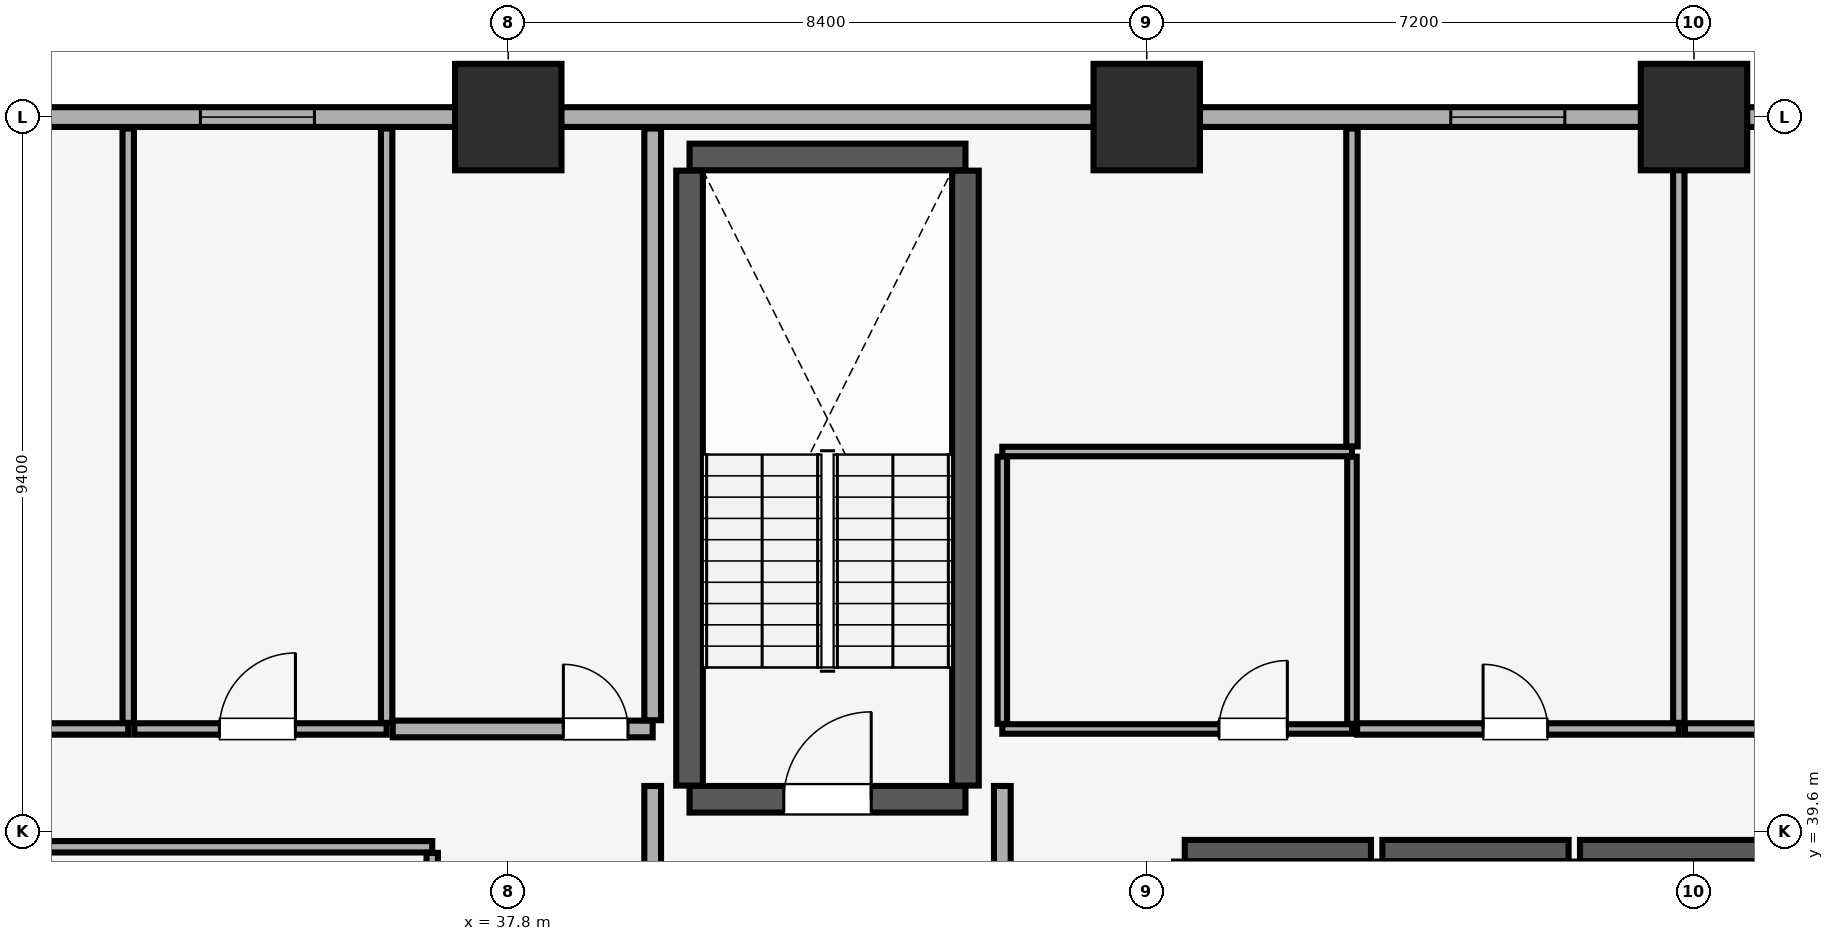
"""IFC4 building model, lengths in metres.
Left out: names, types, materials, properties, quantities, classifications, styles, units other than length and angle.
Written with IfcOpenShell. Run it as: python <this file> out.ifc"""

import sys

from ifc_helpers import new_model, si_unit, direction, frame, frame_2d, origin, origin_2d, place, context, subcontext, project, spatial, rectangle, extrude, element, fill, save


model = new_model("IFC4")
c1 = context("Model", 3, precision=1e-05, world=origin(), true_north=direction((0.0, 1.0)))
c2 = subcontext(c1, "Body", "Model", "MODEL_VIEW")
j1 = project(units=[si_unit("LENGTHUNIT", "METRE"), si_unit("PLANEANGLEUNIT", "RADIAN")], contexts=[c1])
p1 = place(None, origin())
s1 = spatial("IfcSite", under=j1, at=p1, CompositionType="ELEMENT")
p2 = place(p1, origin())
s2 = spatial("IfcBuilding", under=s1, at=p2, CompositionType="ELEMENT")
p3 = place(p2, frame((0.0, 0.0, 72.65)))
s3 = spatial("IfcBuildingStorey", under=s2, at=p3, CompositionType="ELEMENT", Elevation=72.65)
for number, where, z_axis, x_axis in (
    (1, (37.8, 49.0, 0.0), (0.0, 0.0, 1.0), (1.0, 0.0, 0.0)),
    (2, (46.2, 49.0, 0.0), (0.0, 0.0, 1.0), (1.0, 0.0, 0.0)),
    (3, (53.4, 49.0, 0.0), (0.0, 0.0, 1.0), (1.0, 0.0, 0.0)),
):
    element("IfcColumn", number, at=place(p3, frame(where, z_axis=z_axis, x_axis=x_axis)), inside=s3, PredefinedType="COLUMN", context=c2, shape_type="SweptSolid", body=[
        extrude(rectangle(XDim=1.4, YDim=1.4, at=origin_2d()), origin(), (0.0, 0.0, 1.0), 3.51),
    ])
p4 = place(p3, frame((79.8, 49.0, 0.0), z_axis=(0.0, 0.0, 1.0), x_axis=(-1.0, 0.0, 0.0)))
e4 = element("IfcWall", 4, at=p4, inside=s3, PredefinedType="SOLIDWALL", context=c2, shape_type="SweptSolid", body=[
    extrude(rectangle(XDim=75.6, YDim=0.26, at=frame_2d((37.8, 0.0))), origin(), (0.0, 0.0, 1.0), 2.56),
])
p5 = place(p4, frame((72.565, 0.0, 0.85)))
e5 = element("IfcOpeningElement", 5, at=p5, cuts=e4, PredefinedType="OPENING", context=c2, shape_type="SweptSolid", body=[
    extrude(rectangle(XDim=1.5, YDim=1.4, at=frame_2d((0.75, 0.7))), frame((0.0, 0.14, 0.0), z_axis=(0.0, -1.0, 0.0), x_axis=(1.0, 0.0, 0.0)), (0.0, 0.0, 1.0), 0.28),
])
p6 = place(p4, frame((67.45, 0.0, 0.85)))
e6 = element("IfcOpeningElement", 6, at=p6, cuts=e4, PredefinedType="OPENING", context=c2, shape_type="SweptSolid", body=[
    extrude(rectangle(XDim=1.5, YDim=1.4, at=frame_2d((0.75, 0.7))), frame((0.0, 0.14, 0.0), z_axis=(0.0, -1.0, 0.0), x_axis=(1.0, 0.0, 0.0)), (0.0, 0.0, 1.0), 0.28),
])
p7 = place(p4, frame((6.65, 0.0, 0.85)))
e7 = element("IfcOpeningElement", 7, at=p7, cuts=e4, PredefinedType="OPENING", context=c2, shape_type="SweptSolid", body=[
    extrude(rectangle(XDim=1.5, YDim=1.4, at=frame_2d((0.75, 0.7))), frame((0.0, 0.14, 0.0), z_axis=(0.0, -1.0, 0.0), x_axis=(1.0, 0.0, 0.0)), (0.0, 0.0, 1.0), 0.28),
])
p8 = place(p4, frame((1.535, 0.0, 0.85)))
e8 = element("IfcOpeningElement", 8, at=p8, cuts=e4, PredefinedType="OPENING", context=c2, shape_type="SweptSolid", body=[
    extrude(rectangle(XDim=1.5, YDim=1.4, at=frame_2d((0.75, 0.7))), frame((0.0, 0.14, 0.0), z_axis=(0.0, -1.0, 0.0), x_axis=(1.0, 0.0, 0.0)), (0.0, 0.0, 1.0), 0.28),
])
p9 = place(p4, frame((51.365, 0.0, 0.9)))
e9 = element("IfcOpeningElement", 9, at=p9, cuts=e4, PredefinedType="OPENING", context=c2, shape_type="SweptSolid", body=[
    extrude(rectangle(XDim=1.5, YDim=1.4, at=frame_2d((0.75, 0.7))), frame((0.0, 0.14, 0.0), z_axis=(0.0, -1.0, 0.0), x_axis=(1.0, 0.0, 0.0)), (0.0, 0.0, 1.0), 0.28),
])
p10 = place(p4, frame((44.55, 0.0, 0.9)))
e10 = element("IfcOpeningElement", 10, at=p10, cuts=e4, PredefinedType="OPENING", context=c2, shape_type="SweptSolid", body=[
    extrude(rectangle(XDim=1.5, YDim=1.4, at=frame_2d((0.75, 0.7))), frame((0.0, 0.14, 0.0), z_axis=(0.0, -1.0, 0.0), x_axis=(1.0, 0.0, 0.0)), (0.0, 0.0, 1.0), 0.28),
])
p11 = place(p4, frame((28.1, 0.0, 0.9)))
e11 = element("IfcOpeningElement", 11, at=p11, cuts=e4, PredefinedType="OPENING", context=c2, shape_type="SweptSolid", body=[
    extrude(rectangle(XDim=1.5, YDim=1.4, at=frame_2d((0.75, 0.7))), frame((0.0, 0.14, 0.0), z_axis=(0.0, -1.0, 0.0), x_axis=(1.0, 0.0, 0.0)), (0.0, 0.0, 1.0), 0.28),
])
p12 = place(p4, frame((23.485, 0.0, 0.9)))
e12 = element("IfcOpeningElement", 12, at=p12, cuts=e4, PredefinedType="OPENING", context=c2, shape_type="SweptSolid", body=[
    extrude(rectangle(XDim=1.5, YDim=1.4, at=frame_2d((0.75, 0.7))), frame((0.0, 0.14, 0.0), z_axis=(0.0, -1.0, 0.0), x_axis=(1.0, 0.0, 0.0)), (0.0, 0.0, 1.0), 0.28),
])
p13 = place(p3, frame((40.185, 40.025, 0.0), z_axis=(0.0, 0.0, 1.0), x_axis=(1.0, 0.0, 0.0)))
e13 = element("IfcWall", 13, at=p13, inside=s3, PredefinedType="SHEAR", context=c2, shape_type="SweptSolid", body=[
    extrude(rectangle(XDim=3.63, YDim=0.35, at=frame_2d((1.815, 0.0))), origin(), (0.0, 0.0, 1.0), 3.51),
])
p14 = place(p13, frame((1.24, 0.0, 0.0)))
e14 = element("IfcOpeningElement", 14, at=p14, cuts=e13, PredefinedType="OPENING", context=c2, shape_type="SweptSolid", body=[
    extrude(rectangle(XDim=1.15, YDim=2.15, at=frame_2d((0.575, 1.075))), frame((0.0, 0.185, 0.0), z_axis=(0.0, -1.0, 0.0), x_axis=(1.0, 0.0, 0.0)), (0.0, 0.0, 1.0), 0.37),
])
p15 = place(p3, frame((40.185, 48.475, 0.0), z_axis=(0.0, 0.0, 1.0), x_axis=(1.0, 0.0, 0.0)))
e15 = element("IfcWall", 15, at=p15, inside=s3, PredefinedType="SHEAR", context=c2, shape_type="SweptSolid", body=[
    extrude(rectangle(XDim=3.63, YDim=0.35, at=frame_2d((1.815, 0.0))), origin(), (0.0, 0.0, 1.0), 3.51),
])
for number, where, z_axis, x_axis in (
    (16, (40.185, 40.205, 0.0), (0.0, 0.0, 1.0), (0.0, 1.0, 0.0)),
    (17, (43.815, 40.205, 0.0), (0.0, 0.0, 1.0), (0.0, 1.0, 0.0)),
):
    element("IfcWall", number, at=place(p3, frame(where, z_axis=z_axis, x_axis=x_axis)), inside=s3, PredefinedType="SHEAR", context=c2, shape_type="SweptSolid", body=[
        extrude(rectangle(XDim=8.09, YDim=0.35, at=frame_2d((4.045, 0.0))), origin(), (0.0, 0.0, 1.0), 3.51),
    ])
p16 = place(p3, frame((46.7, 39.35, 0.0), z_axis=(0.0, 0.0, 1.0), x_axis=(1.0, 0.0, 0.0)))
e18 = element("IfcWall", 18, at=p16, inside=s3, PredefinedType="SHEAR", context=c2, shape_type="SweptSolid", body=[
    extrude(rectangle(XDim=2.45, YDim=0.28, at=frame_2d((1.225, 0.0))), origin(), (0.0, 0.0, 1.0), 3.51),
])
for number, where, z_axis, x_axis in (
    (19, (46.7, 37.145, 0.0), (0.0, 0.0, 1.0), (0.0, 1.0, 0.0)),
    (20, (49.15, 37.145, 0.0), (0.0, 0.0, 1.0), (0.0, 1.0, 0.0)),
):
    element("IfcWall", number, at=place(p3, frame(where, z_axis=z_axis, x_axis=x_axis)), inside=s3, PredefinedType="SHEAR", context=c2, shape_type="SweptSolid", body=[
        extrude(rectangle(XDim=2.06, YDim=0.28, at=frame_2d((1.03, 0.0))), origin(), (0.0, 0.0, 1.0), 3.51),
    ])
p17 = place(p3, frame((49.3, 39.35, 0.0), z_axis=(0.0, 0.0, 1.0), x_axis=(1.0, 0.0, 0.0)))
e21 = element("IfcWall", 21, at=p17, inside=s3, PredefinedType="SHEAR", context=c2, shape_type="SweptSolid", body=[
    extrude(rectangle(XDim=2.45, YDim=0.28, at=frame_2d((1.225, 0.0))), origin(), (0.0, 0.0, 1.0), 3.51),
])
p18 = place(p3, frame((51.75, 37.145, 0.0), z_axis=(0.0, 0.0, 1.0), x_axis=(0.0, 1.0, 0.0)))
e22 = element("IfcWall", 22, at=p18, inside=s3, PredefinedType="SHEAR", context=c2, shape_type="SweptSolid", body=[
    extrude(rectangle(XDim=2.06, YDim=0.28, at=frame_2d((1.03, 0.0))), origin(), (0.0, 0.0, 1.0), 3.51),
])
p19 = place(p3, frame((51.9, 39.35, 0.0), z_axis=(0.0, 0.0, 1.0), x_axis=(1.0, 0.0, 0.0)))
e23 = element("IfcWall", 23, at=p19, inside=s3, PredefinedType="SHEAR", context=c2, shape_type="SweptSolid", body=[
    extrude(rectangle(XDim=2.59, YDim=0.28, at=frame_2d((1.295, 0.0))), origin(), (0.0, 0.0, 1.0), 3.51),
])
for number, where, z_axis, x_axis in (
    (24, (39.7, 34.415, 0.0), (0.0, 0.0, 1.0), (0.0, 1.0, 0.0)),
    (25, (44.3, 34.415, 0.0), (0.0, 0.0, 1.0), (0.0, 1.0, 0.0)),
):
    element("IfcWall", number, at=place(p3, frame(where, z_axis=z_axis, x_axis=x_axis)), inside=s3, PredefinedType="PARTITIONING", context=c2, shape_type="SweptSolid", body=[
        extrude(rectangle(XDim=5.785, YDim=0.22, at=frame_2d((2.893, 0.0))), origin(), (0.0, 0.0, 1.0), 3.51),
    ])
p20 = place(p3, frame((31.6, 39.4, 0.0), z_axis=(0.0, 0.0, 1.0), x_axis=(1.0, 0.0, 0.0)))
e26 = element("IfcWall", 26, at=p20, inside=s3, PredefinedType="PARTITIONING", context=c2, shape_type="SweptSolid", body=[
    extrude(rectangle(XDim=5.2, YDim=0.15, at=frame_2d((2.6, 0.0))), origin(), (0.0, 0.0, 1.0), 3.51),
])
p21 = place(p3, frame((36.8, 34.38, 0.0), z_axis=(0.0, 0.0, 1.0), x_axis=(0.0, 1.0, 0.0)))
e27 = element("IfcWall", 27, at=p21, inside=s3, PredefinedType="PARTITIONING", context=c2, shape_type="SweptSolid", body=[
    extrude(rectangle(XDim=4.94, YDim=0.15, at=frame_2d((2.47, 0.0))), origin(), (0.0, 0.0, 1.0), 3.51),
])
p22 = place(p3, frame((25.0, 40.95, 0.0), z_axis=(0.0, 0.0, 1.0), x_axis=(1.0, 0.0, 0.0)))
e28 = element("IfcWall", 28, at=p22, inside=s3, PredefinedType="PARTITIONING", context=c2, shape_type="SweptSolid", body=[
    extrude(rectangle(XDim=7.8, YDim=0.15, at=frame_2d((3.9, 0.0))), origin(), (0.0, 0.0, 1.0), 3.51),
])
p23 = place(p22, frame((3.475, 0.0, 0.0)))
e29 = element("IfcOpeningElement", 29, at=p23, cuts=e28, PredefinedType="OPENING", context=c2, shape_type="SweptSolid", body=[
    extrude(rectangle(XDim=0.85, YDim=2.1, at=frame_2d((0.425, 1.05))), frame((0.0, 0.085, 0.0), z_axis=(0.0, -1.0, 0.0), x_axis=(1.0, 0.0, 0.0)), (0.0, 0.0, 1.0), 0.17),
])
p24 = place(p3, frame((32.8, 41.03, 0.0), z_axis=(0.0, 0.0, 1.0), x_axis=(0.0, 1.0, 0.0)))
e30 = element("IfcWall", 30, at=p24, inside=s3, PredefinedType="PARTITIONING", context=c2, shape_type="SweptSolid", body=[
    extrude(rectangle(XDim=7.82, YDim=0.15, at=frame_2d((3.91, 0.0))), origin(), (0.0, 0.0, 1.0), 3.51),
])
p25 = place(p3, frame((32.88, 40.95, 0.0), z_axis=(0.0, 0.0, 1.0), x_axis=(1.0, 0.0, 0.0)))
e31 = element("IfcWall", 31, at=p25, inside=s3, PredefinedType="PARTITIONING", context=c2, shape_type="SweptSolid", body=[
    extrude(rectangle(XDim=3.32, YDim=0.15, at=frame_2d((1.66, 0.0))), origin(), (0.0, 0.0, 1.0), 3.51),
])
p26 = place(p25, frame((1.12, 0.0, 0.0)))
e32 = element("IfcOpeningElement", 32, at=p26, cuts=e31, PredefinedType="OPENING", context=c2, shape_type="SweptSolid", body=[
    extrude(rectangle(XDim=1.0, YDim=2.15, at=frame_2d((0.5, 1.075))), frame((0.0, 0.085, 0.0), z_axis=(0.0, -1.0, 0.0), x_axis=(1.0, 0.0, 0.0)), (0.0, 0.0, 1.0), 0.17),
])
p27 = place(p3, frame((36.2, 41.03, 0.0), z_axis=(0.0, 0.0, 1.0), x_axis=(0.0, 1.0, 0.0)))
e33 = element("IfcWall", 33, at=p27, inside=s3, PredefinedType="PARTITIONING", context=c2, shape_type="SweptSolid", body=[
    extrude(rectangle(XDim=7.82, YDim=0.15, at=frame_2d((3.91, 0.0))), origin(), (0.0, 0.0, 1.0), 3.51),
])
p28 = place(p3, frame((36.28, 40.95, 0.0), z_axis=(0.0, 0.0, 1.0), x_axis=(1.0, 0.0, 0.0)))
e34 = element("IfcWall", 34, at=p28, inside=s3, PredefinedType="PARTITIONING", context=c2, shape_type="SweptSolid", body=[
    extrude(rectangle(XDim=3.42, YDim=0.22, at=frame_2d((1.71, 0.0))), origin(), (0.0, 0.0, 1.0), 3.51),
])
p29 = place(p28, frame((2.245, 0.0, 0.0)))
e35 = element("IfcOpeningElement", 35, at=p29, cuts=e34, PredefinedType="OPENING", context=c2, shape_type="SweptSolid", body=[
    extrude(rectangle(XDim=0.85, YDim=2.1, at=frame_2d((0.425, 1.05))), frame((0.0, 0.12, 0.0), z_axis=(0.0, -1.0, 0.0), x_axis=(1.0, 0.0, 0.0)), (0.0, 0.0, 1.0), 0.24),
])
p30 = place(p3, frame((39.7, 41.065, 0.0), z_axis=(0.0, 0.0, 1.0), x_axis=(0.0, 1.0, 0.0)))
e36 = element("IfcWall", 36, at=p30, inside=s3, PredefinedType="PARTITIONING", context=c2, shape_type="SweptSolid", body=[
    extrude(rectangle(XDim=7.785, YDim=0.22, at=frame_2d((3.893, 0.0))), origin(), (0.0, 0.0, 1.0), 3.51),
])
p31 = place(p3, frame((44.3, 40.95, 0.0), z_axis=(0.0, 0.0, 1.0), x_axis=(1.0, 0.0, 0.0)))
e37 = element("IfcWall", 37, at=p31, inside=s3, PredefinedType="PARTITIONING", context=c2, shape_type="SweptSolid", body=[
    extrude(rectangle(XDim=4.6, YDim=0.125, at=frame_2d((2.3, 0.0))), origin(), (0.0, 0.0, 1.0), 3.51),
])
p32 = place(p31, frame((2.85, 0.0, 0.0)))
e38 = element("IfcOpeningElement", 38, at=p32, cuts=e37, PredefinedType="OPENING", context=c2, shape_type="SweptSolid", body=[
    extrude(rectangle(XDim=0.9, YDim=2.1, at=frame_2d((0.45, 1.05))), frame((0.0, 0.073, 0.0), z_axis=(0.0, -1.0, 0.0), x_axis=(1.0, 0.0, 0.0)), (0.0, 0.0, 1.0), 0.145),
])
p33 = place(p3, frame((44.3, 44.6, 0.0), z_axis=(0.0, 0.0, 1.0), x_axis=(1.0, 0.0, 0.0)))
e39 = element("IfcWall", 39, at=p33, inside=s3, PredefinedType="PARTITIONING", context=c2, shape_type="SweptSolid", body=[
    extrude(rectangle(XDim=4.6, YDim=0.125, at=frame_2d((2.3, 0.0))), origin(), (0.0, 0.0, 1.0), 3.51),
])
for number, where, z_axis, x_axis in (
    (40, (44.3, 41.018, 0.0), (0.0, 0.0, 1.0), (0.0, 1.0, 0.0)),
    (41, (48.9, 41.018, 0.0), (0.0, 0.0, 1.0), (0.0, 1.0, 0.0)),
):
    element("IfcWall", number, at=place(p3, frame(where, z_axis=z_axis, x_axis=x_axis)), inside=s3, PredefinedType="PARTITIONING", context=c2, shape_type="SweptSolid", body=[
        extrude(rectangle(XDim=3.515, YDim=0.125, at=frame_2d((1.757, 0.0))), origin(), (0.0, 0.0, 1.0), 3.51),
    ])
p34 = place(p3, frame((48.968, 40.95, 0.0), z_axis=(0.0, 0.0, 1.0), x_axis=(1.0, 0.0, 0.0)))
e42 = element("IfcWall", 42, at=p34, inside=s3, PredefinedType="PARTITIONING", context=c2, shape_type="SweptSolid", body=[
    extrude(rectangle(XDim=4.232, YDim=0.15, at=frame_2d((2.116, 0.0))), origin(), (0.0, 0.0, 1.0), 3.51),
])
p35 = place(p34, frame((1.657, 0.0, 0.0)))
e43 = element("IfcOpeningElement", 43, at=p35, cuts=e42, PredefinedType="OPENING", context=c2, shape_type="SweptSolid", body=[
    extrude(rectangle(XDim=0.85, YDim=2.1, at=frame_2d((0.425, 1.05))), frame((0.0, 0.085, 0.0), z_axis=(0.0, -1.0, 0.0), x_axis=(1.0, 0.0, 0.0)), (0.0, 0.0, 1.0), 0.17),
])
p36 = place(p3, frame((48.9, 44.667, 0.0), z_axis=(0.0, 0.0, 1.0), x_axis=(0.0, 1.0, 0.0)))
e44 = element("IfcWall", 44, at=p36, inside=s3, PredefinedType="PARTITIONING", context=c2, shape_type="SweptSolid", body=[
    extrude(rectangle(XDim=4.183, YDim=0.15, at=frame_2d((2.091, 0.0))), origin(), (0.0, 0.0, 1.0), 3.51),
])
p37 = place(p3, frame((53.2, 41.03, 0.0), z_axis=(0.0, 0.0, 1.0), x_axis=(0.0, 1.0, 0.0)))
e45 = element("IfcWall", 45, at=p37, inside=s3, PredefinedType="PARTITIONING", context=c2, shape_type="SweptSolid", body=[
    extrude(rectangle(XDim=7.82, YDim=0.15, at=frame_2d((3.91, 0.0))), origin(), (0.0, 0.0, 1.0), 3.51),
])
p38 = place(p3, frame((53.28, 40.95, 0.0), z_axis=(0.0, 0.0, 1.0), x_axis=(1.0, 0.0, 0.0)))
e46 = element("IfcWall", 46, at=p38, inside=s3, PredefinedType="PARTITIONING", context=c2, shape_type="SweptSolid", body=[
    extrude(rectangle(XDim=4.22, YDim=0.15, at=frame_2d((2.11, 0.0))), origin(), (0.0, 0.0, 1.0), 3.51),
])
p39 = place(p38, frame((1.645, 0.0, 0.0)))
e47 = element("IfcOpeningElement", 47, at=p39, cuts=e46, PredefinedType="OPENING", context=c2, shape_type="SweptSolid", body=[
    extrude(rectangle(XDim=0.85, YDim=2.1, at=frame_2d((0.425, 1.05))), frame((0.0, 0.085, 0.0), z_axis=(0.0, -1.0, 0.0), x_axis=(1.0, 0.0, 0.0)), (0.0, 0.0, 1.0), 0.17),
])
p40 = place(p10, origin())
e48 = element("IfcWindow", 48, at=p40, inside=s3, PartitioningType="SINGLE_PANEL", PredefinedType="WINDOW", context=c2, shape_type="SweptSolid", body=[
    extrude(rectangle(XDim=1.5, YDim=1.4, at=frame_2d((0.75, 0.7))), frame((0.0, 0.03, 0.0), z_axis=(0.0, -1.0, 0.0), x_axis=(1.0, 0.0, 0.0)), (0.0, 0.0, 1.0), 0.06),
])
fill(e10, e48)
p41 = place(p11, origin())
e49 = element("IfcWindow", 49, at=p41, inside=s3, PartitioningType="SINGLE_PANEL", PredefinedType="WINDOW", context=c2, shape_type="SweptSolid", body=[
    extrude(rectangle(XDim=1.5, YDim=1.4, at=frame_2d((0.75, 0.7))), frame((0.0, 0.03, 0.0), z_axis=(0.0, -1.0, 0.0), x_axis=(1.0, 0.0, 0.0)), (0.0, 0.0, 1.0), 0.06),
])
fill(e11, e49)
p42 = place(p14, origin())
e50 = element("IfcDoor", 50, at=p42, inside=s3, OperationType="SINGLE_SWING_RIGHT", PredefinedType="DOOR", context=c2, shape_type="SweptSolid", body=[
    extrude(rectangle(XDim=1.15, YDim=2.15, at=frame_2d((0.575, 1.075))), frame((0.0, 0.025, 0.0), z_axis=(0.0, -1.0, 0.0), x_axis=(1.0, 0.0, 0.0)), (0.0, 0.0, 1.0), 0.05),
])
fill(e14, e50)
p43 = place(p26, origin())
e51 = element("IfcDoor", 51, at=p43, inside=s3, OperationType="SINGLE_SWING_RIGHT", PredefinedType="DOOR", context=c2, shape_type="SweptSolid", body=[
    extrude(rectangle(XDim=1.0, YDim=2.15, at=frame_2d((0.5, 1.075))), frame((0.0, 0.025, 0.0), z_axis=(0.0, -1.0, 0.0), x_axis=(1.0, 0.0, 0.0)), (0.0, 0.0, 1.0), 0.05),
])
fill(e32, e51)
p44 = place(p29, origin())
e52 = element("IfcDoor", 52, at=p44, inside=s3, OperationType="SINGLE_SWING_LEFT", PredefinedType="DOOR", context=c2, shape_type="SweptSolid", body=[
    extrude(rectangle(XDim=0.85, YDim=2.1, at=frame_2d((0.425, 1.05))), frame((0.0, 0.025, 0.0), z_axis=(0.0, -1.0, 0.0), x_axis=(1.0, 0.0, 0.0)), (0.0, 0.0, 1.0), 0.05),
])
fill(e35, e52)
p45 = place(p32, origin())
e53 = element("IfcDoor", 53, at=p45, inside=s3, OperationType="SINGLE_SWING_RIGHT", PredefinedType="DOOR", context=c2, shape_type="SweptSolid", body=[
    extrude(rectangle(XDim=0.9, YDim=2.1, at=frame_2d((0.45, 1.05))), frame((0.0, 0.025, 0.0), z_axis=(0.0, -1.0, 0.0), x_axis=(1.0, 0.0, 0.0)), (0.0, 0.0, 1.0), 0.05),
])
fill(e38, e53)
p46 = place(p35, origin())
e54 = element("IfcDoor", 54, at=p46, inside=s3, OperationType="SINGLE_SWING_LEFT", PredefinedType="DOOR", context=c2, shape_type="SweptSolid", body=[
    extrude(rectangle(XDim=0.85, YDim=2.1, at=frame_2d((0.425, 1.05))), frame((0.0, 0.025, 0.0), z_axis=(0.0, -1.0, 0.0), x_axis=(1.0, 0.0, 0.0)), (0.0, 0.0, 1.0), 0.05),
])
fill(e43, e54)
save(model, sys.argv[1])
